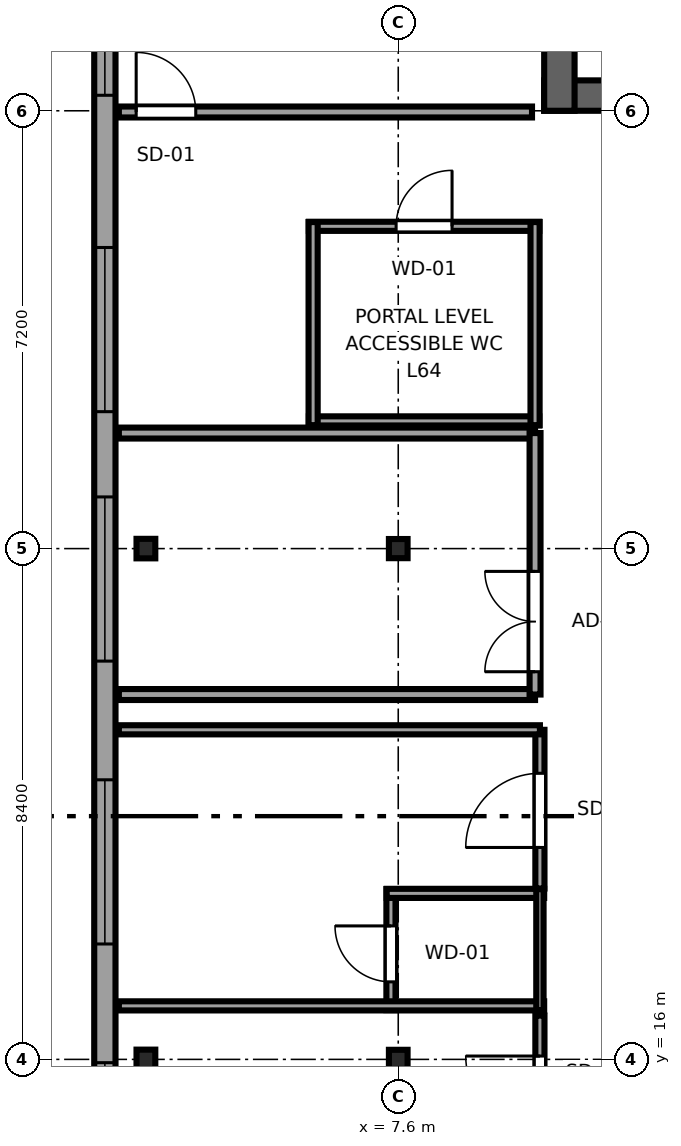
"""IFC4 building model, lengths in metres.
Left out: names, types, materials, properties, quantities, classifications, styles, units other than length and angle.
Written with IfcOpenShell. Run it as: python <this file> out.ifc"""

import sys

from ifc_helpers import new_model, si_unit, direction, frame, frame_2d, origin, origin_2d, place, context, subcontext, project, spatial, rectangle, i_section, extrude, source, transform, mapped, element, fill, save


model = new_model("IFC4")
c1 = context("Model", 3, precision=1e-05, world=origin(), true_north=direction((0.0, 1.0)))
c2 = subcontext(c1, "Body", "Model", "MODEL_VIEW")
j1 = project(units=[si_unit("LENGTHUNIT", "METRE"), si_unit("PLANEANGLEUNIT", "RADIAN")], contexts=[c1])
p1 = place(None, origin())
s1 = spatial("IfcSite", under=j1, at=p1, CompositionType="ELEMENT")
p2 = place(p1, origin())
s2 = spatial("IfcBuilding", under=s1, at=p2, CompositionType="ELEMENT")
p3 = place(p2, frame((0.0, 0.0, 241.65)))
s3 = spatial("IfcBuildingStorey", under=s2, at=p3, CompositionType="ELEMENT", Elevation=241.65)
p4 = place(p3, frame((10.0, 31.85, 0.0), z_axis=(0.0, 0.0, 1.0), x_axis=(1.0, 0.0, 0.0)))
e1 = element("IfcWall", 1, at=p4, inside=s3, PredefinedType="SHEAR", context=c2, shape_type="SweptSolid", body=[
    extrude(rectangle(XDim=26.0, YDim=0.5, at=frame_2d((13.0, 0.0))), origin(), (0.0, 0.0, 1.0), 3.55),
])
p5 = place(p4, frame((7.45, 0.0, 0.0), z_axis=(0.0, 0.0, 1.0), x_axis=(-1.0, 0.0, 0.0)))
e2 = element("IfcOpeningElement", 2, at=p5, cuts=e1, PredefinedType="OPENING", context=c2, shape_type="SweptSolid", body=[
    extrude(rectangle(XDim=1.5, YDim=2.04, at=frame_2d((0.75, 1.02))), frame((0.0, 0.26, 0.0), z_axis=(0.0, -1.0, 0.0), x_axis=(1.0, 0.0, 0.0)), (0.0, 0.0, 1.0), 0.52),
])
p6 = place(p4, frame((13.75, 0.0, 0.0), z_axis=(0.0, 0.0, 1.0), x_axis=(-1.0, 0.0, 0.0)))
e3 = element("IfcOpeningElement", 3, at=p6, cuts=e1, PredefinedType="OPENING", context=c2, shape_type="SweptSolid", body=[
    extrude(rectangle(XDim=1.5, YDim=2.04, at=frame_2d((0.75, 1.02))), frame((0.0, 0.26, 0.0), z_axis=(0.0, -1.0, 0.0), x_axis=(1.0, 0.0, 0.0)), (0.0, 0.0, 1.0), 0.52),
])
p7 = place(p4, frame((20.05, 0.0, 0.0), z_axis=(0.0, 0.0, 1.0), x_axis=(-1.0, 0.0, 0.0)))
e4 = element("IfcOpeningElement", 4, at=p7, cuts=e1, PredefinedType="OPENING", context=c2, shape_type="SweptSolid", body=[
    extrude(rectangle(XDim=1.5, YDim=2.04, at=frame_2d((0.75, 1.02))), frame((0.0, 0.26, 0.0), z_axis=(0.0, -1.0, 0.0), x_axis=(1.0, 0.0, 0.0)), (0.0, 0.0, 1.0), 0.52),
])
p8 = place(p3, frame((10.25, 31.6, 0.0), z_axis=(0.0, 0.0, 1.0), x_axis=(0.0, 1.0, 0.0)))
e5 = element("IfcWall", 5, at=p8, inside=s3, PredefinedType="SHEAR", context=c2, shape_type="SweptSolid", body=[
    extrude(rectangle(XDim=13.6, YDim=0.5, at=frame_2d((6.8, 0.0))), origin(), (0.0, 0.0, 1.0), 3.55),
])
m1 = source(origin(), c2, "Body", "SweptSolid", [
    extrude(i_section(OverallWidth=0.309, OverallDepth=0.321, WebThickness=0.014, FlangeThickness=0.022, FilletRadius=0.017, at=origin_2d()), origin(), (0.0, 0.0, 1.0), 3.55),
])
p9 = place(p3, frame((3.45, 16.0, 0.0), z_axis=(0.0, 0.0, 1.0), x_axis=(1.0, 0.0, 0.0)))
e6 = element("IfcColumn", 6, at=p9, inside=s3, PredefinedType="COLUMN", context=c2, shape_type="MappedRepresentation", body=[
    mapped(m1, transform((0.0, 0.0, 0.0), x_axis=(1.0, 0.0, 0.0), y_axis=(0.0, 1.0, 0.0), z_axis=(0.0, 0.0, 1.0), scale=1.0)),
])
m2 = source(origin(), c2, "Body", "SweptSolid", [
    extrude(i_section(OverallWidth=0.307, OverallDepth=0.315, WebThickness=0.012, FlangeThickness=0.019, FilletRadius=0.017, at=origin_2d()), origin(), (0.0, 0.0, 1.0), 3.55),
])
p10 = place(p3, frame((7.6, 16.0, 0.0), z_axis=(0.0, 0.0, 1.0), x_axis=(1.0, 0.0, 0.0)))
e7 = element("IfcColumn", 7, at=p10, inside=s3, PredefinedType="COLUMN", context=c2, shape_type="MappedRepresentation", body=[
    mapped(m2, transform((0.0, 0.0, 0.0), x_axis=(1.0, 0.0, 0.0), y_axis=(0.0, 1.0, 0.0), z_axis=(0.0, 0.0, 1.0), scale=1.0)),
])
p11 = place(p3, frame((3.45, 24.4, 0.0), z_axis=(0.0, 0.0, 1.0), x_axis=(1.0, 0.0, 0.0)))
e8 = element("IfcColumn", 8, at=p11, inside=s3, PredefinedType="COLUMN", context=c2, shape_type="MappedRepresentation", body=[
    mapped(m1, transform((0.0, 0.0, 0.0), x_axis=(1.0, 0.0, 0.0), y_axis=(0.0, 1.0, 0.0), z_axis=(0.0, 0.0, 1.0), scale=1.0)),
])
p12 = place(p3, frame((7.6, 24.4, 0.0), z_axis=(0.0, 0.0, 1.0), x_axis=(1.0, 0.0, 0.0)))
e9 = element("IfcColumn", 9, at=p12, inside=s3, PredefinedType="COLUMN", context=c2, shape_type="MappedRepresentation", body=[
    mapped(m2, transform((0.0, 0.0, 0.0), x_axis=(1.0, 0.0, 0.0), y_axis=(0.0, 1.0, 0.0), z_axis=(0.0, 0.0, 1.0), scale=1.0)),
])
p13 = place(p3, frame((2.775, 40.783, 0.0), z_axis=(0.0, 0.0, 1.0), x_axis=(0.0, -1.0, 0.0)))
e10 = element("IfcWall", 10, at=p13, inside=s3, PredefinedType="SOLIDWALL", context=c2, shape_type="SweptSolid", body=[
    extrude(rectangle(XDim=33.766, YDim=0.35, at=frame_2d((16.883, 0.0))), origin(), (0.0, 0.0, 1.0), 3.37),
])
p14 = place(p13, frame((1.576, 0.0, 0.68)))
e11 = element("IfcOpeningElement", 11, at=p14, cuts=e10, PredefinedType="OPENING", context=c2, shape_type="SweptSolid", body=[
    extrude(rectangle(XDim=2.7, YDim=1.95, at=frame_2d((1.35, 0.975))), frame((0.0, 0.185, 0.0), z_axis=(0.0, -1.0, 0.0), x_axis=(1.0, 0.0, 0.0)), (0.0, 0.0, 1.0), 0.37),
])
p15 = place(p13, frame((6.228, 0.0, 0.68)))
e12 = element("IfcOpeningElement", 12, at=p15, cuts=e10, PredefinedType="OPENING", context=c2, shape_type="SweptSolid", body=[
    extrude(rectangle(XDim=2.7, YDim=1.95, at=frame_2d((1.35, 0.975))), frame((0.0, 0.185, 0.0), z_axis=(0.0, -1.0, 0.0), x_axis=(1.0, 0.0, 0.0)), (0.0, 0.0, 1.0), 0.37),
])
p16 = place(p13, frame((11.431, 0.0, 0.68)))
e13 = element("IfcOpeningElement", 13, at=p16, cuts=e10, PredefinedType="OPENING", context=c2, shape_type="SweptSolid", body=[
    extrude(rectangle(XDim=2.7, YDim=1.95, at=frame_2d((1.35, 0.975))), frame((0.0, 0.185, 0.0), z_axis=(0.0, -1.0, 0.0), x_axis=(1.0, 0.0, 0.0)), (0.0, 0.0, 1.0), 0.37),
])
p17 = place(p13, frame((15.533, 0.0, 0.68)))
e14 = element("IfcOpeningElement", 14, at=p17, cuts=e10, PredefinedType="OPENING", context=c2, shape_type="SweptSolid", body=[
    extrude(rectangle(XDim=2.7, YDim=1.95, at=frame_2d((1.35, 0.975))), frame((0.0, 0.185, 0.0), z_axis=(0.0, -1.0, 0.0), x_axis=(1.0, 0.0, 0.0)), (0.0, 0.0, 1.0), 0.37),
])
p18 = place(p13, frame((20.185, 0.0, 0.68)))
e15 = element("IfcOpeningElement", 15, at=p18, cuts=e10, PredefinedType="OPENING", context=c2, shape_type="SweptSolid", body=[
    extrude(rectangle(XDim=2.7, YDim=1.95, at=frame_2d((1.35, 0.975))), frame((0.0, 0.185, 0.0), z_axis=(0.0, -1.0, 0.0), x_axis=(1.0, 0.0, 0.0)), (0.0, 0.0, 1.0), 0.37),
])
p19 = place(p13, frame((24.837, 0.0, 0.68)))
e16 = element("IfcOpeningElement", 16, at=p19, cuts=e10, PredefinedType="OPENING", context=c2, shape_type="SweptSolid", body=[
    extrude(rectangle(XDim=2.7, YDim=1.95, at=frame_2d((1.35, 0.975))), frame((0.0, 0.185, 0.0), z_axis=(0.0, -1.0, 0.0), x_axis=(1.0, 0.0, 0.0)), (0.0, 0.0, 1.0), 0.37),
])
p20 = place(p13, frame((29.489, 0.0, 0.68)))
e17 = element("IfcOpeningElement", 17, at=p20, cuts=e10, PredefinedType="OPENING", context=c2, shape_type="SweptSolid", body=[
    extrude(rectangle(XDim=2.7, YDim=1.95, at=frame_2d((1.35, 0.975))), frame((0.0, 0.185, 0.0), z_axis=(0.0, -1.0, 0.0), x_axis=(1.0, 0.0, 0.0)), (0.0, 0.0, 1.0), 0.37),
])
p21 = place(p3, frame((7.48, 16.81, 0.0), z_axis=(0.0, 0.0, 1.0), x_axis=(0.0, 1.0, 0.0)))
e18 = element("IfcWall", 18, at=p21, inside=s3, PredefinedType="PARTITIONING", context=c2, shape_type="SweptSolid", body=[
    extrude(rectangle(XDim=1.99, YDim=0.15, at=frame_2d((0.995, 0.0))), origin(), (0.0, 0.0, 1.0), 2.16),
])
p22 = place(p21, frame((0.465, 0.0, 0.0)))
e19 = element("IfcOpeningElement", 19, at=p22, cuts=e18, PredefinedType="OPENING", context=c2, shape_type="SweptSolid", body=[
    extrude(rectangle(XDim=0.92, YDim=2.01, at=frame_2d((0.46, 1.005))), frame((0.0, 0.085, 0.0), z_axis=(0.0, -1.0, 0.0), x_axis=(1.0, 0.0, 0.0)), (0.0, 0.0, 1.0), 0.17),
])
p23 = place(p3, frame((3.005, 16.88, 0.0), z_axis=(0.0, 0.0, 1.0), x_axis=(1.0, 0.0, 0.0)))
e20 = element("IfcWall", 20, at=p23, inside=s3, PredefinedType="PARTITIONING", context=c2, shape_type="SweptSolid", body=[
    extrude(rectangle(XDim=6.995, YDim=0.15, at=frame_2d((3.498, 0.0))), origin(), (0.0, 0.0, 1.0), 3.37),
])
p24 = place(p3, frame((7.41, 18.73, 0.0), z_axis=(0.0, 0.0, 1.0), x_axis=(1.0, 0.0, 0.0)))
e21 = element("IfcWall", 21, at=p24, inside=s3, PredefinedType="PARTITIONING", context=c2, shape_type="SweptSolid", body=[
    extrude(rectangle(XDim=2.59, YDim=0.15, at=frame_2d((1.295, 0.0))), origin(), (0.0, 0.0, 1.0), 3.37),
])
p25 = place(p3, frame((9.93, 16.81, 0.0), z_axis=(0.0, 0.0, 1.0), x_axis=(0.0, 1.0, 0.0)))
e22 = element("IfcWall", 22, at=p25, inside=s3, PredefinedType="PLUMBINGWALL", context=c2, shape_type="SweptSolid", body=[
    extrude(rectangle(XDim=1.99, YDim=0.12, at=frame_2d((0.995, 0.0))), origin(), (0.0, 0.0, 1.0), 3.37),
])
p26 = place(p3, frame((9.93, 14.21, 0.0), z_axis=(0.0, 0.0, 1.0), x_axis=(0.0, 1.0, 0.0)))
e23 = element("IfcWall", 23, at=p26, inside=s3, PredefinedType="PARTITIONING", context=c2, shape_type="SweptSolid", body=[
    extrude(rectangle(XDim=2.51, YDim=0.15, at=frame_2d((1.255, 0.0))), origin(), (0.0, 0.0, 1.0), 3.37),
])
p27 = place(p26, frame((0.625, 0.0, 0.0)))
e24 = element("IfcOpeningElement", 24, at=p27, cuts=e23, PredefinedType="OPENING", context=c2, shape_type="SweptSolid", body=[
    extrude(rectangle(XDim=1.22, YDim=2.08, at=frame_2d((0.61, 1.04))), frame((0.0, 0.085, 0.0), z_axis=(0.0, -1.0, 0.0), x_axis=(1.0, 0.0, 0.0)), (0.0, 0.0, 1.0), 0.17),
])
p28 = place(p3, frame((9.93, 18.81, 0.0), z_axis=(0.0, 0.0, 1.0), x_axis=(0.0, 1.0, 0.0)))
e25 = element("IfcWall", 25, at=p28, inside=s3, PredefinedType="PARTITIONING", context=c2, shape_type="SweptSolid", body=[
    extrude(rectangle(XDim=2.61, YDim=0.15, at=frame_2d((1.305, 0.0))), origin(), (0.0, 0.0, 1.0), 3.37),
])
p29 = place(p28, frame((0.675, 0.0, 0.0)))
e26 = element("IfcOpeningElement", 26, at=p29, cuts=e25, PredefinedType="OPENING", context=c2, shape_type="SweptSolid", body=[
    extrude(rectangle(XDim=1.22, YDim=2.08, at=frame_2d((0.61, 1.04))), frame((0.0, 0.085, 0.0), z_axis=(0.0, -1.0, 0.0), x_axis=(1.0, 0.0, 0.0)), (0.0, 0.0, 1.0), 0.17),
])
p30 = place(p3, frame((3.005, 21.42, 0.0), z_axis=(0.0, 0.0, 1.0), x_axis=(1.0, 0.0, 0.0)))
e27 = element("IfcWall", 27, at=p30, inside=s3, PredefinedType="PARTITIONING", context=c2, shape_type="SweptSolid", body=[
    extrude(rectangle(XDim=6.925, YDim=0.15, at=frame_2d((3.462, 0.0))), origin(), (0.0, 0.0, 1.0), 3.37),
])
for number, where, z_axis, x_axis in (
    (28, (3.005, 22.0, 0.0), (0.0, 0.0, 1.0), (1.0, 0.0, 0.0)),
    (29, (3.005, 26.3, 0.0), (0.0, 0.0, 1.0), (1.0, 0.0, 0.0)),
):
    element("IfcWall", number, at=place(p3, frame(where, z_axis=z_axis, x_axis=x_axis)), inside=s3, PredefinedType="PARTITIONING", context=c2, shape_type="SweptSolid", body=[
        extrude(rectangle(XDim=6.845, YDim=0.18, at=frame_2d((3.423, 0.0))), origin(), (0.0, 0.0, 1.0), 3.37),
    ])
p31 = place(p3, frame((9.85, 22.0, 0.0), z_axis=(0.0, 0.0, 1.0), x_axis=(0.0, 1.0, 0.0)))
e30 = element("IfcWall", 30, at=p31, inside=s3, PredefinedType="PARTITIONING", context=c2, shape_type="SweptSolid", body=[
    extrude(rectangle(XDim=4.3, YDim=0.18, at=frame_2d((2.15, 0.0))), origin(), (0.0, 0.0, 1.0), 3.37),
])
p32 = place(p31, frame((0.375, 0.0, 0.0)))
e31 = element("IfcOpeningElement", 31, at=p32, cuts=e30, PredefinedType="OPENING", context=c2, shape_type="SweptSolid", body=[
    extrude(rectangle(XDim=1.65, YDim=2.15, at=frame_2d((0.825, 1.075))), frame((0.0, 0.1, 0.0), z_axis=(0.0, -1.0, 0.0), x_axis=(1.0, 0.0, 0.0)), (0.0, 0.0, 1.0), 0.2),
])
p33 = place(p3, frame((6.13, 26.5, 0.0), z_axis=(0.0, 0.0, 1.0), x_axis=(1.0, 0.0, 0.0)))
e32 = element("IfcWall", 32, at=p33, inside=s3, PredefinedType="PARTITIONING", context=c2, shape_type="SweptSolid", body=[
    extrude(rectangle(XDim=3.79, YDim=0.15, at=frame_2d((1.895, 0.0))), origin(), (0.0, 0.0, 1.0), 3.37),
])
p34 = place(p3, frame((6.13, 29.7, 0.0), z_axis=(0.0, 0.0, 1.0), x_axis=(1.0, 0.0, 0.0)))
e33 = element("IfcWall", 33, at=p34, inside=s3, PredefinedType="PARTITIONING", context=c2, shape_type="SweptSolid", body=[
    extrude(rectangle(XDim=3.79, YDim=0.15, at=frame_2d((1.895, 0.0))), origin(), (0.0, 0.0, 1.0), 3.37),
])
p35 = place(p34, frame((1.435, 0.0, 0.0)))
e34 = element("IfcOpeningElement", 34, at=p35, cuts=e33, PredefinedType="OPENING", context=c2, shape_type="SweptSolid", body=[
    extrude(rectangle(XDim=0.92, YDim=2.01, at=frame_2d((0.46, 1.005))), frame((0.0, 0.085, 0.0), z_axis=(0.0, -1.0, 0.0), x_axis=(1.0, 0.0, 0.0)), (0.0, 0.0, 1.0), 0.17),
])
for number, where, z_axis, x_axis in (
    (35, (6.2, 26.43, 0.0), (0.0, 0.0, 1.0), (0.0, 1.0, 0.0)),
    (36, (9.85, 26.43, 0.0), (0.0, 0.0, 1.0), (0.0, 1.0, 0.0)),
):
    element("IfcWall", number, at=place(p3, frame(where, z_axis=z_axis, x_axis=x_axis)), inside=s3, PredefinedType="PARTITIONING", context=c2, shape_type="SweptSolid", body=[
        extrude(rectangle(XDim=3.34, YDim=0.15, at=frame_2d((1.67, 0.0))), origin(), (0.0, 0.0, 1.0), 3.37),
    ])
p36 = place(p3, frame((3.005, 31.58, 0.0), z_axis=(0.0, 0.0, 1.0), x_axis=(1.0, 0.0, 0.0)))
e37 = element("IfcWall", 37, at=p36, inside=s3, PredefinedType="PARTITIONING", context=c2, shape_type="SweptSolid", body=[
    extrude(rectangle(XDim=6.795, YDim=0.18, at=frame_2d((3.397, 0.0))), origin(), (0.0, 0.0, 1.0), 3.37),
])
p37 = place(p36, frame((0.285, 0.0, 0.0)))
e38 = element("IfcOpeningElement", 38, at=p37, cuts=e37, PredefinedType="OPENING", context=c2, shape_type="SweptSolid", body=[
    extrude(rectangle(XDim=0.98, YDim=2.12, at=frame_2d((0.49, 1.06))), frame((0.0, 0.1, 0.0), z_axis=(0.0, -1.0, 0.0), x_axis=(1.0, 0.0, 0.0)), (0.0, 0.0, 1.0), 0.2),
])
m3 = source(origin(), c2, "Body", "SweptSolid", [
    extrude(rectangle(XDim=2.7, YDim=1.95, at=frame_2d((1.35, 0.975))), frame((0.0, 0.09, 0.0), z_axis=(0.0, -1.0, 0.0), x_axis=(1.0, 0.0, 0.0)), (0.0, 0.0, 1.0), 0.06),
])
p38 = place(p15, origin())
e39 = element("IfcWindow", 39, at=p38, inside=s3, PartitioningType="TRIPLE_PANEL_HORIZONTAL", PredefinedType="WINDOW", context=c2, shape_type="MappedRepresentation", body=[
    mapped(m3, transform((0.0, 0.0, 0.0), x_axis=(1.0, 0.0, 0.0), y_axis=(0.0, 1.0, 0.0), z_axis=(0.0, 0.0, 1.0), scale=1.0)),
])
fill(e12, e39)
p39 = place(p16, origin())
e40 = element("IfcWindow", 40, at=p39, inside=s3, PartitioningType="TRIPLE_PANEL_HORIZONTAL", PredefinedType="WINDOW", context=c2, shape_type="MappedRepresentation", body=[
    mapped(m3, transform((0.0, 0.0, 0.0), x_axis=(1.0, 0.0, 0.0), y_axis=(0.0, 1.0, 0.0), z_axis=(0.0, 0.0, 1.0), scale=1.0)),
])
fill(e13, e40)
p40 = place(p17, origin())
e41 = element("IfcWindow", 41, at=p40, inside=s3, PartitioningType="TRIPLE_PANEL_HORIZONTAL", PredefinedType="WINDOW", context=c2, shape_type="MappedRepresentation", body=[
    mapped(m3, transform((0.0, 0.0, 0.0), x_axis=(1.0, 0.0, 0.0), y_axis=(0.0, 1.0, 0.0), z_axis=(0.0, 0.0, 1.0), scale=1.0)),
])
fill(e14, e41)
p41 = place(p18, origin())
e42 = element("IfcWindow", 42, at=p41, inside=s3, PartitioningType="TRIPLE_PANEL_HORIZONTAL", PredefinedType="WINDOW", context=c2, shape_type="MappedRepresentation", body=[
    mapped(m3, transform((0.0, 0.0, 0.0), x_axis=(1.0, 0.0, 0.0), y_axis=(0.0, 1.0, 0.0), z_axis=(0.0, 0.0, 1.0), scale=1.0)),
])
fill(e15, e42)
p42 = place(p19, origin())
e43 = element("IfcWindow", 43, at=p42, inside=s3, PartitioningType="TRIPLE_PANEL_HORIZONTAL", PredefinedType="WINDOW", context=c2, shape_type="MappedRepresentation", body=[
    mapped(m3, transform((0.0, 0.0, 0.0), x_axis=(1.0, 0.0, 0.0), y_axis=(0.0, 1.0, 0.0), z_axis=(0.0, 0.0, 1.0), scale=1.0)),
])
fill(e16, e43)
m4 = source(origin(), c2, "Body", "SweptSolid", [
    extrude(rectangle(XDim=0.92, YDim=2.01, at=frame_2d((0.46, 1.005))), frame((0.0, 0.025, 0.0), z_axis=(0.0, -1.0, 0.0), x_axis=(1.0, 0.0, 0.0)), (0.0, 0.0, 1.0), 0.05),
])
p43 = place(p22, origin())
e44 = element("IfcDoor", 44, at=p43, inside=s3, OperationType="SINGLE_SWING_RIGHT", PredefinedType="DOOR", context=c2, shape_type="MappedRepresentation", body=[
    mapped(m4, transform((0.0, 0.0, 0.0), x_axis=(1.0, 0.0, 0.0), y_axis=(0.0, 1.0, 0.0), z_axis=(0.0, 0.0, 1.0), scale=1.0)),
])
fill(e19, e44)
m5 = source(origin(), c2, "Body", "SweptSolid", [
    extrude(rectangle(XDim=1.22, YDim=2.08, at=frame_2d((0.61, 1.04))), frame((0.0, 0.025, 0.0), z_axis=(0.0, -1.0, 0.0), x_axis=(1.0, 0.0, 0.0)), (0.0, 0.0, 1.0), 0.05),
])
p44 = place(p27, origin())
e45 = element("IfcDoor", 45, at=p44, inside=s3, OperationType="SINGLE_SWING_RIGHT", PredefinedType="DOOR", context=c2, shape_type="MappedRepresentation", body=[
    mapped(m5, transform((0.0, 0.0, 0.0), x_axis=(1.0, 0.0, 0.0), y_axis=(0.0, 1.0, 0.0), z_axis=(0.0, 0.0, 1.0), scale=1.0)),
])
fill(e24, e45)
p45 = place(p29, origin())
e46 = element("IfcDoor", 46, at=p45, inside=s3, OperationType="SINGLE_SWING_LEFT", PredefinedType="DOOR", context=c2, shape_type="MappedRepresentation", body=[
    mapped(m5, transform((0.0, 0.0, 0.0), x_axis=(1.0, 0.0, 0.0), y_axis=(0.0, 1.0, 0.0), z_axis=(0.0, 0.0, 1.0), scale=1.0)),
])
fill(e26, e46)
m6 = source(origin(), c2, "Body", "SweptSolid", [
    extrude(rectangle(XDim=1.65, YDim=2.15, at=frame_2d((0.825, 1.075))), frame((0.0, 0.025, 0.0), z_axis=(0.0, -1.0, 0.0), x_axis=(1.0, 0.0, 0.0)), (0.0, 0.0, 1.0), 0.05),
])
p46 = place(p32, origin())
e47 = element("IfcDoor", 47, at=p46, inside=s3, OperationType="DOUBLE_DOOR_SINGLE_SWING", PredefinedType="DOOR", context=c2, shape_type="MappedRepresentation", body=[
    mapped(m6, transform((0.0, 0.0, 0.0), x_axis=(1.0, 0.0, 0.0), y_axis=(0.0, 1.0, 0.0), z_axis=(0.0, 0.0, 1.0), scale=1.0)),
])
fill(e31, e47)
p47 = place(p35, origin())
e48 = element("IfcDoor", 48, at=p47, inside=s3, OperationType="SINGLE_SWING_RIGHT", PredefinedType="DOOR", context=c2, shape_type="MappedRepresentation", body=[
    mapped(m4, transform((0.0, 0.0, 0.0), x_axis=(1.0, 0.0, 0.0), y_axis=(0.0, 1.0, 0.0), z_axis=(0.0, 0.0, 1.0), scale=1.0)),
])
fill(e34, e48)
m7 = source(origin(), c2, "Body", "SweptSolid", [
    extrude(rectangle(XDim=0.98, YDim=2.12, at=frame_2d((0.49, 1.06))), frame((0.0, 0.025, 0.0), z_axis=(0.0, -1.0, 0.0), x_axis=(1.0, 0.0, 0.0)), (0.0, 0.0, 1.0), 0.05),
])
p48 = place(p37, origin())
e49 = element("IfcDoor", 49, at=p48, inside=s3, OperationType="SINGLE_SWING_LEFT", PredefinedType="DOOR", context=c2, shape_type="MappedRepresentation", body=[
    mapped(m7, transform((0.0, 0.0, 0.0), x_axis=(1.0, 0.0, 0.0), y_axis=(0.0, 1.0, 0.0), z_axis=(0.0, 0.0, 1.0), scale=1.0)),
])
fill(e38, e49)
save(model, sys.argv[1])
